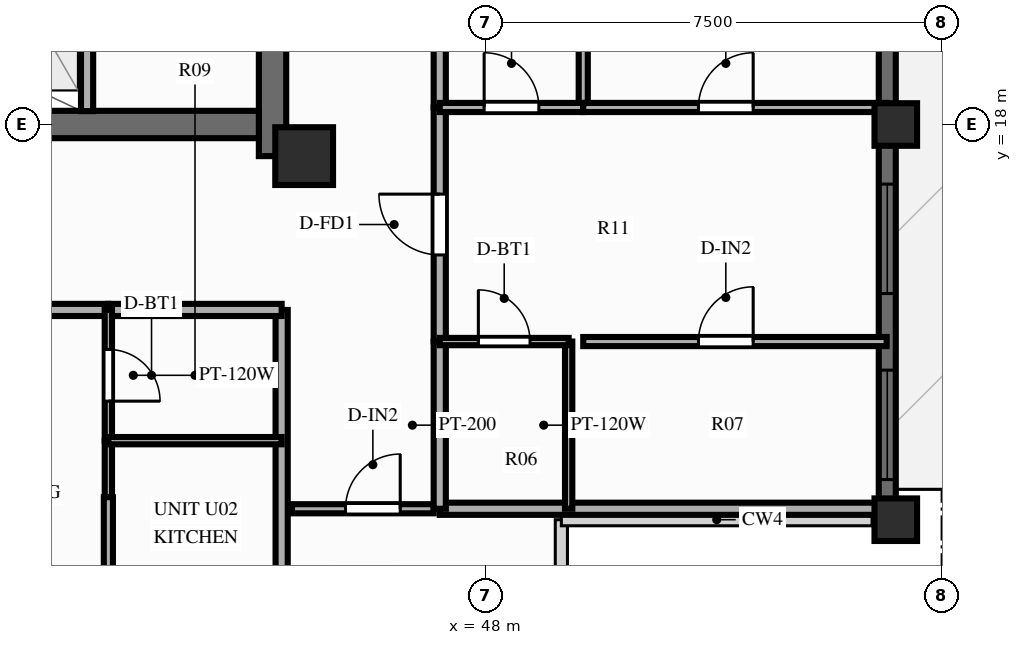
"""IFC4 building model, lengths in metres.
Left out: names, types, materials, properties, quantities, classifications, styles, units other than length and angle.
Written with IfcOpenShell. Run it as: python <this file> out.ifc"""

import sys

from ifc_helpers import new_model, si_unit, direction, frame, frame_2d, origin, origin_2d, place, context, subcontext, project, spatial, rectangle, extrude, source, transform, mapped, element, fill, save


model = new_model("IFC4")
c1 = context("Model", 3, precision=1e-05, world=origin(), true_north=direction((0.0, 1.0)))
c2 = subcontext(c1, "Body", "Model", "MODEL_VIEW")
j1 = project(units=[si_unit("LENGTHUNIT", "METRE"), si_unit("PLANEANGLEUNIT", "RADIAN")], contexts=[c1])
p1 = place(None, origin())
s1 = spatial("IfcSite", under=j1, at=p1, CompositionType="ELEMENT")
p2 = place(p1, origin())
s2 = spatial("IfcBuilding", under=s1, at=p2, CompositionType="ELEMENT")
p3 = place(p2, frame((0.0, 0.0, 226.2)))
s3 = spatial("IfcBuildingStorey", under=s2, at=p3, CompositionType="ELEMENT", Elevation=226.2)
p4 = place(p3, frame((44.5, 17.48, 0.0), z_axis=(0.0, 0.0, 1.0), x_axis=(0.0, 1.0, 0.0)))
e1 = element("IfcWall", 1, at=p4, inside=s3, PredefinedType="SHEAR", context=c2, shape_type="SweptSolid", body=[
    extrude(rectangle(XDim=19.04, YDim=0.45, at=frame_2d((9.52, 0.0))), origin(), (0.0, 0.0, 1.0), 3.9),
])
p5 = place(p4, frame((12.67, 0.0, 0.0), z_axis=(0.0, 0.0, 1.0), x_axis=(-1.0, 0.0, 0.0)))
e2 = element("IfcOpeningElement", 2, at=p5, cuts=e1, PredefinedType="OPENING", context=c2, shape_type="SweptSolid", body=[
    extrude(rectangle(XDim=1.1, YDim=2.15, at=frame_2d((0.55, 1.075))), frame((0.0, 0.237, 0.0), z_axis=(0.0, -1.0, 0.0), x_axis=(1.0, 0.0, 0.0)), (0.0, 0.0, 1.0), 0.474),
])
p6 = place(p3, frame((31.725, 18.0, 0.0), z_axis=(0.0, 0.0, 1.0), x_axis=(1.0, 0.0, 0.0)))
e3 = element("IfcWall", 3, at=p6, inside=s3, PredefinedType="SHEAR", context=c2, shape_type="SweptSolid", body=[
    extrude(rectangle(XDim=12.55, YDim=0.45, at=frame_2d((6.275, 0.0))), origin(), (0.0, 0.0, 1.0), 3.9),
])
m1 = source(origin(), c2, "Body", "SweptSolid", [
    extrude(rectangle(XDim=0.95, YDim=0.95, at=origin_2d()), origin(), (0.0, 0.0, 1.0), 3.9),
])
p7 = place(p3, frame((45.02, 17.48, 0.0), z_axis=(0.0, 0.0, 1.0), x_axis=(1.0, 0.0, 0.0)))
e4 = element("IfcColumn", 4, at=p7, inside=s3, PredefinedType="COLUMN", context=c2, shape_type="MappedRepresentation", body=[
    mapped(m1, transform((0.0, 0.0, 0.0), scale=1.0)),
])
m2 = source(origin(), c2, "Body", "SweptSolid", [
    extrude(rectangle(XDim=0.7, YDim=0.7, at=origin_2d()), origin(), (0.0, 0.0, 1.0), 3.9),
])
for number, where, z_axis, x_axis in (
    (5, (54.75, 11.5, 0.0), (0.0, 0.0, 1.0), (1.0, 0.0, 0.0)),
    (6, (54.75, 18.0, 0.0), (0.0, 0.0, 1.0), (1.0, 0.0, 0.0)),
):
    element("IfcColumn", number, at=place(p3, frame(where, z_axis=z_axis, x_axis=x_axis)), inside=s3, PredefinedType="COLUMN", context=c2, shape_type="MappedRepresentation", body=[
        mapped(m2, transform((0.0, 0.0, 0.0), scale=1.0)),
    ])
p8 = place(p3, frame((54.61, 11.5, 0.0), z_axis=(0.0, 0.0, 1.0), x_axis=(0.0, 1.0, 0.0)))
e7 = element("IfcWall", 7, at=p8, inside=s3, PredefinedType="SOLIDWALL", context=c2, shape_type="SweptSolid", body=[
    extrude(rectangle(XDim=31.0, YDim=0.28, at=frame_2d((15.5, 0.0))), origin(), (0.0, 0.0, 1.0), 2.79),
])
p9 = place(p8, frame((0.66, 0.0, 0.85)))
e8 = element("IfcOpeningElement", 8, at=p9, cuts=e7, PredefinedType="OPENING", context=c2, shape_type="SweptSolid", body=[
    extrude(rectangle(XDim=1.8, YDim=1.65, at=frame_2d((0.9, 0.825))), frame((0.0, 0.152, 0.0), z_axis=(0.0, -1.0, 0.0), x_axis=(1.0, 0.0, 0.0)), (0.0, 0.0, 1.0), 0.304),
])
p10 = place(p8, frame((3.72, 0.0, 0.85)))
e9 = element("IfcOpeningElement", 9, at=p10, cuts=e7, PredefinedType="OPENING", context=c2, shape_type="SweptSolid", body=[
    extrude(rectangle(XDim=1.8, YDim=1.65, at=frame_2d((0.9, 0.825))), frame((0.0, 0.152, 0.0), z_axis=(0.0, -1.0, 0.0), x_axis=(1.0, 0.0, 0.0)), (0.0, 0.0, 1.0), 0.304),
])
p11 = place(p8, frame((7.942, 0.0, 0.85)))
e10 = element("IfcOpeningElement", 10, at=p11, cuts=e7, PredefinedType="OPENING", context=c2, shape_type="SweptSolid", body=[
    extrude(rectangle(XDim=1.8, YDim=1.65, at=frame_2d((0.9, 0.825))), frame((0.0, 0.152, 0.0), z_axis=(0.0, -1.0, 0.0), x_axis=(1.0, 0.0, 0.0)), (0.0, 0.0, 1.0), 0.304),
])
p12 = place(p8, frame((11.379, 0.0, 0.85)))
e11 = element("IfcOpeningElement", 11, at=p12, cuts=e7, PredefinedType="OPENING", context=c2, shape_type="SweptSolid", body=[
    extrude(rectangle(XDim=1.8, YDim=1.65, at=frame_2d((0.9, 0.825))), frame((0.0, 0.152, 0.0), z_axis=(0.0, -1.0, 0.0), x_axis=(1.0, 0.0, 0.0)), (0.0, 0.0, 1.0), 0.304),
])
p13 = place(p8, frame((16.213, 0.0, 0.0), z_axis=(0.0, 0.0, 1.0), x_axis=(-1.0, 0.0, 0.0)))
e12 = element("IfcOpeningElement", 12, at=p13, cuts=e7, PredefinedType="OPENING", context=c2, shape_type="SweptSolid", body=[
    extrude(rectangle(XDim=1.6, YDim=2.15, at=frame_2d((0.8, 1.075))), frame((0.0, 0.152, 0.0), z_axis=(0.0, -1.0, 0.0), x_axis=(1.0, 0.0, 0.0)), (0.0, 0.0, 1.0), 0.304),
])
p14 = place(p8, frame((18.194, 0.0, 0.85)))
e13 = element("IfcOpeningElement", 13, at=p14, cuts=e7, PredefinedType="OPENING", context=c2, shape_type="SweptSolid", body=[
    extrude(rectangle(XDim=1.8, YDim=1.65, at=frame_2d((0.9, 0.825))), frame((0.0, 0.152, 0.0), z_axis=(0.0, -1.0, 0.0), x_axis=(1.0, 0.0, 0.0)), (0.0, 0.0, 1.0), 0.304),
])
p15 = place(p8, frame((21.488, 0.0, 0.85)))
e14 = element("IfcOpeningElement", 14, at=p15, cuts=e7, PredefinedType="OPENING", context=c2, shape_type="SweptSolid", body=[
    extrude(rectangle(XDim=1.8, YDim=1.65, at=frame_2d((0.9, 0.825))), frame((0.0, 0.152, 0.0), z_axis=(0.0, -1.0, 0.0), x_axis=(1.0, 0.0, 0.0)), (0.0, 0.0, 1.0), 0.304),
])
p16 = place(p8, frame((25.142, 0.0, 0.85)))
e15 = element("IfcOpeningElement", 15, at=p16, cuts=e7, PredefinedType="OPENING", context=c2, shape_type="SweptSolid", body=[
    extrude(rectangle(XDim=1.5, YDim=1.65, at=frame_2d((0.75, 0.825))), frame((0.0, 0.152, 0.0), z_axis=(0.0, -1.0, 0.0), x_axis=(1.0, 0.0, 0.0)), (0.0, 0.0, 1.0), 0.304),
])
p17 = place(p8, frame((28.052, 0.0, 0.85)))
e16 = element("IfcOpeningElement", 16, at=p17, cuts=e7, PredefinedType="OPENING", context=c2, shape_type="SweptSolid", body=[
    extrude(rectangle(XDim=1.8, YDim=1.65, at=frame_2d((0.9, 0.825))), frame((0.0, 0.152, 0.0), z_axis=(0.0, -1.0, 0.0), x_axis=(1.0, 0.0, 0.0)), (0.0, 0.0, 1.0), 0.304),
])
p18 = place(p3, frame((41.45, 18.22, 0.0), z_axis=(0.0, 0.0, 1.0), x_axis=(0.0, 1.0, 0.0)))
e17 = element("IfcWall", 17, at=p18, inside=s3, PredefinedType="PARTITIONING", context=c2, shape_type="SweptSolid", body=[
    extrude(rectangle(XDim=2.96, YDim=0.2, at=frame_2d((1.48, 0.0))), origin(), (0.0, 0.0, 1.0), 3.69),
])
p19 = place(p3, frame((44.82, 11.68, 0.0), z_axis=(0.0, 0.0, 1.0), x_axis=(1.0, 0.0, 0.0)))
e18 = element("IfcWall", 18, at=p19, inside=s3, PredefinedType="PARTITIONING", context=c2, shape_type="SweptSolid", body=[
    extrude(rectangle(XDim=2.33, YDim=0.15, at=frame_2d((1.165, 0.0))), origin(), (0.0, 0.0, 1.0), 3.69),
])
p20 = place(p19, frame((0.88, 0.0, 0.0)))
e19 = element("IfcOpeningElement", 19, at=p20, cuts=e18, PredefinedType="OPENING", context=c2, shape_type="SweptSolid", body=[
    extrude(rectangle(XDim=0.9, YDim=2.1, at=frame_2d((0.45, 1.05))), frame((0.0, 0.087, 0.0), z_axis=(0.0, -1.0, 0.0), x_axis=(1.0, 0.0, 0.0)), (0.0, 0.0, 1.0), 0.174),
])
p21 = place(p3, frame((44.65, 14.95, 0.0), z_axis=(0.0, 0.0, 1.0), x_axis=(0.0, -1.0, 0.0)))
e20 = element("IfcWall", 20, at=p21, inside=s3, PredefinedType="PARTITIONING", context=c2, shape_type="SweptSolid", body=[
    extrude(rectangle(XDim=8.8, YDim=0.2, at=frame_2d((4.4, 0.0))), origin(), (0.0, 0.0, 1.0), 2.79),
])
p22 = place(p3, frame((38.0, 14.95, 0.0), z_axis=(0.0, 0.0, 1.0), x_axis=(1.0, 0.0, 0.0)))
e21 = element("IfcWall", 21, at=p22, inside=s3, PredefinedType="PARTITIONING", context=c2, shape_type="SweptSolid", body=[
    extrude(rectangle(XDim=3.8, YDim=0.2, at=frame_2d((1.9, 0.0))), origin(), (0.0, 0.0, 1.0), 3.69),
])
p23 = place(p22, frame((1.4, 0.0, 0.0)))
e22 = element("IfcOpeningElement", 22, at=p23, cuts=e21, PredefinedType="OPENING", context=c2, shape_type="SweptSolid", body=[
    extrude(rectangle(XDim=1.0, YDim=2.15, at=frame_2d((0.5, 1.075))), frame((0.0, 0.112, 0.0), z_axis=(0.0, -1.0, 0.0), x_axis=(1.0, 0.0, 0.0)), (0.0, 0.0, 1.0), 0.224),
])
p24 = place(p3, frame((41.8, 14.95, 0.0), z_axis=(0.0, 0.0, 1.0), x_axis=(1.0, 0.0, 0.0)))
e23 = element("IfcWall", 23, at=p24, inside=s3, PredefinedType="PARTITIONING", context=c2, shape_type="SweptSolid", body=[
    extrude(rectangle(XDim=2.85, YDim=0.2, at=frame_2d((1.425, 0.0))), origin(), (0.0, 0.0, 1.0), 3.69),
])
p25 = place(p3, frame((41.8, 14.95, 0.0), z_axis=(0.0, 0.0, 1.0), x_axis=(0.0, -1.0, 0.0)))
e24 = element("IfcWall", 24, at=p25, inside=s3, PredefinedType="PARTITIONING", context=c2, shape_type="SweptSolid", body=[
    extrude(rectangle(XDim=2.15, YDim=0.12, at=frame_2d((1.075, 0.0))), origin(), (0.0, 0.0, 1.0), 3.69),
])
p26 = place(p25, frame((0.65, 0.0, 0.0)))
e25 = element("IfcOpeningElement", 25, at=p26, cuts=e24, PredefinedType="OPENING", context=c2, shape_type="SweptSolid", body=[
    extrude(rectangle(XDim=0.85, YDim=2.05, at=frame_2d((0.425, 1.025))), frame((0.0, 0.072, 0.0), z_axis=(0.0, -1.0, 0.0), x_axis=(1.0, 0.0, 0.0)), (0.0, 0.0, 1.0), 0.144),
])
p27 = place(p3, frame((41.8, 12.8, 0.0), z_axis=(0.0, 0.0, 1.0), x_axis=(0.0, -1.0, 0.0)))
e26 = element("IfcWall", 26, at=p27, inside=s3, PredefinedType="PARTITIONING", context=c2, shape_type="SweptSolid", body=[
    extrude(rectangle(XDim=0.93, YDim=0.12, at=frame_2d((0.465, 0.0))), origin(), (0.0, 0.0, 1.0), 3.69),
])
p28 = place(p3, frame((41.8, 12.8, 0.0), z_axis=(0.0, 0.0, 1.0), x_axis=(1.0, 0.0, 0.0)))
e27 = element("IfcWall", 27, at=p28, inside=s3, PredefinedType="PARTITIONING", context=c2, shape_type="SweptSolid", body=[
    extrude(rectangle(XDim=2.85, YDim=0.12, at=frame_2d((1.425, 0.0))), origin(), (0.0, 0.0, 1.0), 3.69),
])
p29 = place(p3, frame((41.8, 11.87, 0.0), z_axis=(0.0, 0.0, 1.0), x_axis=(0.0, -1.0, 0.0)))
e28 = element("IfcWall", 28, at=p29, inside=s3, PredefinedType="PARTITIONING", context=c2, shape_type="SweptSolid", body=[
    extrude(rectangle(XDim=5.72, YDim=0.15, at=frame_2d((2.86, 0.0))), origin(), (0.0, 0.0, 1.0), 3.69),
])
p30 = place(p29, frame((2.229, 0.0, 0.0)))
e29 = element("IfcOpeningElement", 29, at=p30, cuts=e28, PredefinedType="OPENING", context=c2, shape_type="SweptSolid", body=[
    extrude(rectangle(XDim=0.9, YDim=2.1, at=frame_2d((0.45, 1.05))), frame((0.0, 0.087, 0.0), z_axis=(0.0, -1.0, 0.0), x_axis=(1.0, 0.0, 0.0)), (0.0, 0.0, 1.0), 0.174),
])
p31 = place(p3, frame((47.25, 11.68, 0.0), z_axis=(0.0, 0.0, 1.0), x_axis=(1.0, 0.0, 0.0)))
e30 = element("IfcWall", 30, at=p31, inside=s3, PredefinedType="PARTITIONING", context=c2, shape_type="SweptSolid", body=[
    extrude(rectangle(XDim=7.35, YDim=0.2, at=frame_2d((3.675, 0.0))), origin(), (0.0, 0.0, 1.0), 3.69),
])
p32 = place(p3, frame((47.25, 11.68, 0.0), z_axis=(0.0, 0.0, 1.0), x_axis=(0.0, 1.0, 0.0)))
e31 = element("IfcWall", 31, at=p32, inside=s3, PredefinedType="PARTITIONING", context=c2, shape_type="SweptSolid", body=[
    extrude(rectangle(XDim=2.75, YDim=0.2, at=frame_2d((1.375, 0.0))), origin(), (0.0, 0.0, 1.0), 3.69),
])
p33 = place(p3, frame((47.25, 14.43, 0.0), z_axis=(0.0, 0.0, 1.0), x_axis=(0.0, 1.0, 0.0)))
e32 = element("IfcWall", 32, at=p33, inside=s3, PredefinedType="PARTITIONING", context=c2, shape_type="SweptSolid", body=[
    extrude(rectangle(XDim=3.85, YDim=0.2, at=frame_2d((1.925, 0.0))), origin(), (0.0, 0.0, 1.0), 3.69),
])
p34 = place(p33, frame((1.425, 0.0, 0.0)))
e33 = element("IfcOpeningElement", 33, at=p34, cuts=e32, PredefinedType="OPENING", context=c2, shape_type="SweptSolid", body=[
    extrude(rectangle(XDim=1.0, YDim=2.15, at=frame_2d((0.5, 1.075))), frame((0.0, 0.112, 0.0), z_axis=(0.0, -1.0, 0.0), x_axis=(1.0, 0.0, 0.0)), (0.0, 0.0, 1.0), 0.224),
])
p35 = place(p3, frame((47.25, 18.28, 0.0), z_axis=(0.0, 0.0, 1.0), x_axis=(0.0, 1.0, 0.0)))
e34 = element("IfcWall", 34, at=p35, inside=s3, PredefinedType="PARTITIONING", context=c2, shape_type="SweptSolid", body=[
    extrude(rectangle(XDim=4.124, YDim=0.2, at=frame_2d((2.062, 0.0))), origin(), (0.0, 0.0, 1.0), 3.69),
])
p36 = place(p3, frame((49.37, 11.68, 0.0), z_axis=(0.0, 0.0, 1.0), x_axis=(0.0, 1.0, 0.0)))
e35 = element("IfcWall", 35, at=p36, inside=s3, PredefinedType="PARTITIONING", context=c2, shape_type="SweptSolid", body=[
    extrude(rectangle(XDim=2.75, YDim=0.12, at=frame_2d((1.375, 0.0))), origin(), (0.0, 0.0, 1.0), 3.69),
])
p37 = place(p3, frame((49.61, 18.28, 0.0), z_axis=(0.0, 0.0, 1.0), x_axis=(0.0, 1.0, 0.0)))
e36 = element("IfcWall", 36, at=p37, inside=s3, PredefinedType="PARTITIONING", context=c2, shape_type="SweptSolid", body=[
    extrude(rectangle(XDim=4.124, YDim=0.15, at=frame_2d((2.062, 0.0))), origin(), (0.0, 0.0, 1.0), 3.39),
])
p38 = place(p3, frame((47.25, 14.43, 0.0), z_axis=(0.0, 0.0, 1.0), x_axis=(1.0, 0.0, 0.0)))
e37 = element("IfcWall", 37, at=p38, inside=s3, PredefinedType="PARTITIONING", context=c2, shape_type="SweptSolid", body=[
    extrude(rectangle(XDim=2.12, YDim=0.12, at=frame_2d((1.06, 0.0))), origin(), (0.0, 0.0, 1.0), 3.69),
])
p39 = place(p38, frame((0.635, 0.0, 0.0)))
e38 = element("IfcOpeningElement", 38, at=p39, cuts=e37, PredefinedType="OPENING", context=c2, shape_type="SweptSolid", body=[
    extrude(rectangle(XDim=0.85, YDim=2.05, at=frame_2d((0.425, 1.025))), frame((0.0, 0.072, 0.0), z_axis=(0.0, -1.0, 0.0), x_axis=(1.0, 0.0, 0.0)), (0.0, 0.0, 1.0), 0.144),
])
p40 = place(p3, frame((49.61, 14.43, 0.0), z_axis=(0.0, 0.0, 1.0), x_axis=(1.0, 0.0, 0.0)))
e39 = element("IfcWall", 39, at=p40, inside=s3, PredefinedType="PARTITIONING", context=c2, shape_type="SweptSolid", body=[
    extrude(rectangle(XDim=4.99, YDim=0.15, at=frame_2d((2.495, 0.0))), origin(), (0.0, 0.0, 1.0), 3.69),
])
p41 = place(p40, frame((1.895, 0.0, 0.0)))
e40 = element("IfcOpeningElement", 40, at=p41, cuts=e39, PredefinedType="OPENING", context=c2, shape_type="SweptSolid", body=[
    extrude(rectangle(XDim=0.9, YDim=2.1, at=frame_2d((0.45, 1.05))), frame((0.0, 0.087, 0.0), z_axis=(0.0, -1.0, 0.0), x_axis=(1.0, 0.0, 0.0)), (0.0, 0.0, 1.0), 0.174),
])
p42 = place(p3, frame((47.25, 18.28, 0.0), z_axis=(0.0, 0.0, 1.0), x_axis=(1.0, 0.0, 0.0)))
e41 = element("IfcWall", 41, at=p42, inside=s3, PredefinedType="PARTITIONING", context=c2, shape_type="SweptSolid", body=[
    extrude(rectangle(XDim=2.36, YDim=0.15, at=frame_2d((1.18, 0.0))), origin(), (0.0, 0.0, 1.0), 3.69),
])
p43 = place(p42, frame((0.73, 0.0, 0.0)))
e42 = element("IfcOpeningElement", 42, at=p43, cuts=e41, PredefinedType="OPENING", context=c2, shape_type="SweptSolid", body=[
    extrude(rectangle(XDim=0.9, YDim=2.1, at=frame_2d((0.45, 1.05))), frame((0.0, 0.087, 0.0), z_axis=(0.0, -1.0, 0.0), x_axis=(1.0, 0.0, 0.0)), (0.0, 0.0, 1.0), 0.174),
])
p44 = place(p3, frame((49.61, 18.28, 0.0), z_axis=(0.0, 0.0, 1.0), x_axis=(1.0, 0.0, 0.0)))
e43 = element("IfcWall", 43, at=p44, inside=s3, PredefinedType="PARTITIONING", context=c2, shape_type="SweptSolid", body=[
    extrude(rectangle(XDim=4.99, YDim=0.15, at=frame_2d((2.495, 0.0))), origin(), (0.0, 0.0, 1.0), 3.69),
])
p45 = place(p44, frame((1.895, 0.0, 0.0)))
e44 = element("IfcOpeningElement", 44, at=p45, cuts=e43, PredefinedType="OPENING", context=c2, shape_type="SweptSolid", body=[
    extrude(rectangle(XDim=0.9, YDim=2.1, at=frame_2d((0.45, 1.05))), frame((0.0, 0.087, 0.0), z_axis=(0.0, -1.0, 0.0), x_axis=(1.0, 0.0, 0.0)), (0.0, 0.0, 1.0), 0.174),
])
m3 = source(origin(), c2, "Body", "SweptSolid", [
    extrude(rectangle(XDim=1.8, YDim=1.65, at=frame_2d((0.9, 0.825))), frame((0.0, 0.03, 0.0), z_axis=(0.0, -1.0, 0.0), x_axis=(1.0, 0.0, 0.0)), (0.0, 0.0, 1.0), 0.06),
])
p46 = place(p9, origin())
e45 = element("IfcWindow", 45, at=p46, inside=s3, PartitioningType="SINGLE_PANEL", PredefinedType="WINDOW", context=c2, shape_type="MappedRepresentation", body=[
    mapped(m3, transform((0.0, 0.0, 0.0), scale=1.0)),
])
fill(e8, e45)
p47 = place(p10, origin())
e46 = element("IfcWindow", 46, at=p47, inside=s3, PartitioningType="SINGLE_PANEL", PredefinedType="WINDOW", context=c2, shape_type="MappedRepresentation", body=[
    mapped(m3, transform((0.0, 0.0, 0.0), scale=1.0)),
])
fill(e9, e46)
m4 = source(origin(), c2, "Body", "SweptSolid", [
    extrude(rectangle(XDim=0.9, YDim=2.1, at=frame_2d((0.45, 1.05))), frame((0.0, 0.025, 0.0), z_axis=(0.0, -1.0, 0.0), x_axis=(1.0, 0.0, 0.0)), (0.0, 0.0, 1.0), 0.05),
])
p48 = place(p20, origin())
e47 = element("IfcDoor", 47, at=p48, inside=s3, OperationType="SINGLE_SWING_RIGHT", PredefinedType="DOOR", context=c2, shape_type="MappedRepresentation", body=[
    mapped(m4, transform((0.0, 0.0, 0.0), scale=1.0)),
])
fill(e19, e47)
m5 = source(origin(), c2, "Body", "SweptSolid", [
    extrude(rectangle(XDim=0.85, YDim=2.05, at=frame_2d((0.425, 1.025))), frame((0.0, 0.025, 0.0), z_axis=(0.0, -1.0, 0.0), x_axis=(1.0, 0.0, 0.0)), (0.0, 0.0, 1.0), 0.05),
])
p49 = place(p26, origin())
e48 = element("IfcDoor", 48, at=p49, inside=s3, OperationType="SINGLE_SWING_RIGHT", PredefinedType="DOOR", context=c2, shape_type="MappedRepresentation", body=[
    mapped(m5, transform((0.0, 0.0, 0.0), scale=1.0)),
])
fill(e25, e48)
m6 = source(origin(), c2, "Body", "SweptSolid", [
    extrude(rectangle(XDim=1.0, YDim=2.15, at=frame_2d((0.5, 1.075))), frame((0.0, 0.025, 0.0), z_axis=(0.0, -1.0, 0.0), x_axis=(1.0, 0.0, 0.0)), (0.0, 0.0, 1.0), 0.05),
])
p50 = place(p34, origin())
e49 = element("IfcDoor", 49, at=p50, inside=s3, OperationType="SINGLE_SWING_RIGHT", PredefinedType="DOOR", context=c2, shape_type="MappedRepresentation", body=[
    mapped(m6, transform((0.0, 0.0, 0.0), scale=1.0)),
])
fill(e33, e49)
p51 = place(p39, origin())
e50 = element("IfcDoor", 50, at=p51, inside=s3, OperationType="SINGLE_SWING_LEFT", PredefinedType="DOOR", context=c2, shape_type="MappedRepresentation", body=[
    mapped(m5, transform((0.0, 0.0, 0.0), scale=1.0)),
])
fill(e38, e50)
p52 = place(p41, origin())
e51 = element("IfcDoor", 51, at=p52, inside=s3, OperationType="SINGLE_SWING_RIGHT", PredefinedType="DOOR", context=c2, shape_type="MappedRepresentation", body=[
    mapped(m4, transform((0.0, 0.0, 0.0), scale=1.0)),
])
fill(e40, e51)
p53 = place(p43, origin())
e52 = element("IfcDoor", 52, at=p53, inside=s3, OperationType="SINGLE_SWING_LEFT", PredefinedType="DOOR", context=c2, shape_type="MappedRepresentation", body=[
    mapped(m4, transform((0.0, 0.0, 0.0), scale=1.0)),
])
fill(e42, e52)
p54 = place(p45, origin())
e53 = element("IfcDoor", 53, at=p54, inside=s3, OperationType="SINGLE_SWING_RIGHT", PredefinedType="DOOR", context=c2, shape_type="MappedRepresentation", body=[
    mapped(m4, transform((0.0, 0.0, 0.0), scale=1.0)),
])
fill(e44, e53)
save(model, sys.argv[1])
